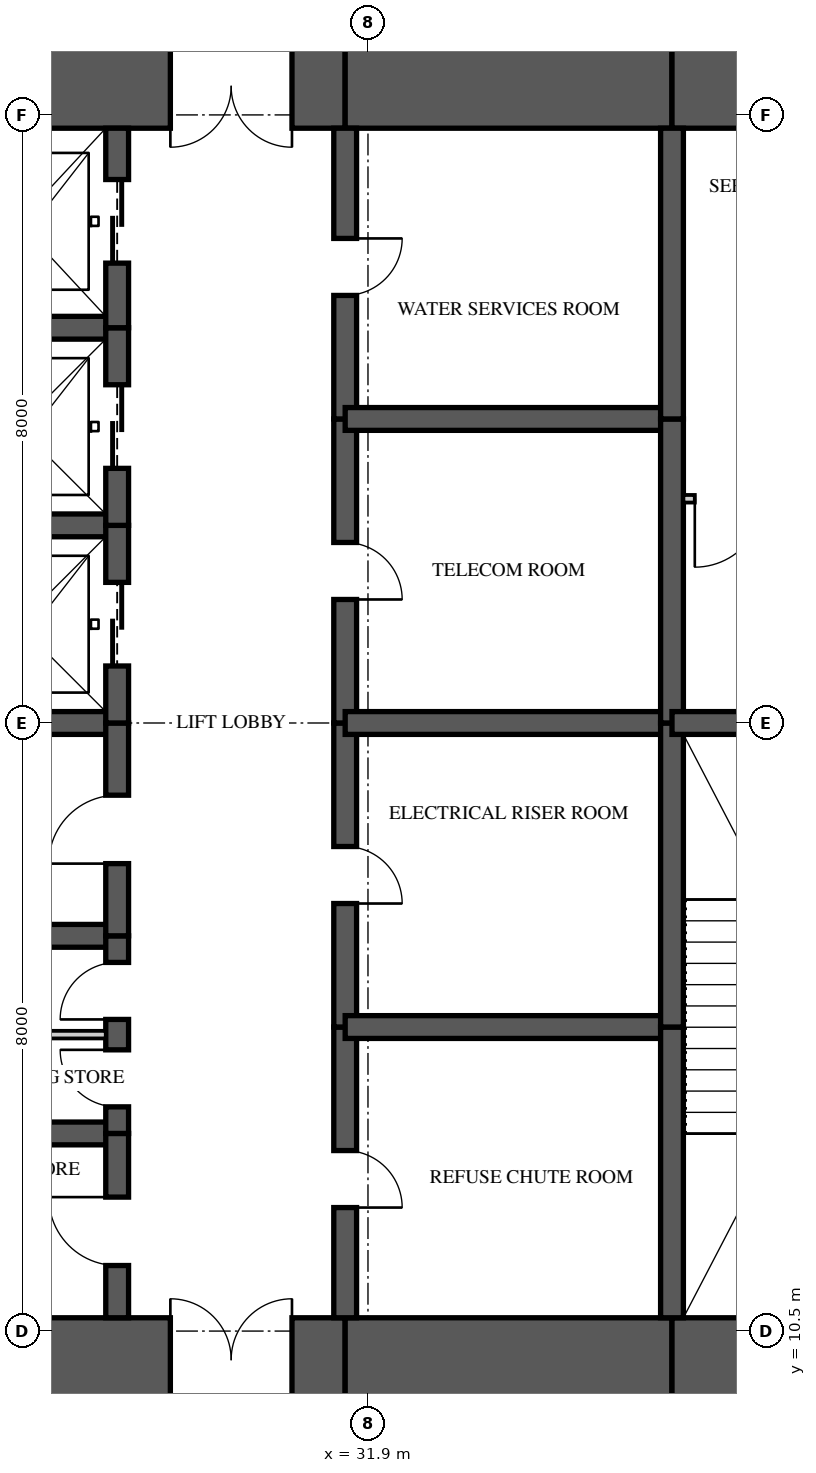
"""IFC4 building model, lengths in metres.
Left out: names, types, materials, properties, quantities, classifications, styles, units other than length and angle.
Written with IfcOpenShell. Run it as: python <this file> out.ifc"""

import sys

from ifc_helpers import new_model, si_unit, direction, frame, frame_2d, origin, place, context, subcontext, project, spatial, rectangle, extrude, element, fill, save


model = new_model("IFC4")
c1 = context("Model", 3, precision=1e-05, world=origin(), true_north=direction((0.0, 1.0)))
c2 = subcontext(c1, "Body", "Model", "MODEL_VIEW")
j1 = project(units=[si_unit("LENGTHUNIT", "METRE"), si_unit("PLANEANGLEUNIT", "RADIAN")], contexts=[c1])
p1 = place(None, origin())
s1 = spatial("IfcSite", under=j1, at=p1, CompositionType="ELEMENT")
p2 = place(p1, origin())
s2 = spatial("IfcBuilding", under=s1, at=p2, CompositionType="ELEMENT")
p3 = place(p2, frame((0.0, 0.0, 245.95)))
s3 = spatial("IfcBuildingStorey", under=s2, at=p3, CompositionType="ELEMENT", Elevation=245.95)
p4 = place(p3, frame((26.0, 10.125, 0.0), z_axis=(0.0, 0.0, 1.0), x_axis=(1.0, 0.0, 0.0)))
e1 = element("IfcWall", 1, at=p4, inside=s3, PredefinedType="SHEAR", context=c2, shape_type="SweptSolid", body=[
    extrude(rectangle(XDim=5.6, YDim=1.1, at=frame_2d((2.8, 0.0))), origin(), (0.0, 0.0, 1.0), 3.5),
])
p5 = place(p4, frame((3.3, 0.0, 0.0)))
e2 = element("IfcOpeningElement", 2, at=p5, cuts=e1, PredefinedType="OPENING", context=c2, shape_type="SweptSolid", body=[
    extrude(rectangle(XDim=1.6, YDim=2.1, at=frame_2d((0.8, 1.05))), frame((0.0, 0.56, 0.0), z_axis=(0.0, -1.0, 0.0), x_axis=(1.0, 0.0, 0.0)), (0.0, 0.0, 1.0), 1.12),
])
p6 = place(p3, frame((31.6, 10.125, 0.0), z_axis=(0.0, 0.0, 1.0), x_axis=(1.0, 0.0, 0.0)))
e3 = element("IfcWall", 3, at=p6, inside=s3, PredefinedType="SHEAR", context=c2, shape_type="SweptSolid", body=[
    extrude(rectangle(XDim=4.3, YDim=1.1, at=frame_2d((2.15, 0.0))), origin(), (0.0, 0.0, 1.0), 3.5),
])
p7 = place(p3, frame((35.9, 10.125, 0.0), z_axis=(0.0, 0.0, 1.0), x_axis=(1.0, 0.0, 0.0)))
e4 = element("IfcWall", 4, at=p7, inside=s3, PredefinedType="SHEAR", context=c2, shape_type="SweptSolid", body=[
    extrude(rectangle(XDim=8.175, YDim=1.1, at=frame_2d((4.087, 0.0))), origin(), (0.0, 0.0, 1.0), 3.5),
])
p8 = place(p7, frame((2.7, 0.0, 0.0)))
e5 = element("IfcOpeningElement", 5, at=p8, cuts=e4, PredefinedType="OPENING", context=c2, shape_type="SweptSolid", body=[
    extrude(rectangle(XDim=1.0, YDim=2.1, at=frame_2d((0.5, 1.05))), frame((0.0, 0.56, 0.0), z_axis=(0.0, -1.0, 0.0), x_axis=(1.0, 0.0, 0.0)), (0.0, 0.0, 1.0), 1.12),
])
p9 = place(p3, frame((44.075, 26.875, 0.0), z_axis=(0.0, 0.0, 1.0), x_axis=(-1.0, 0.0, 0.0)))
e6 = element("IfcWall", 6, at=p9, inside=s3, PredefinedType="SHEAR", context=c2, shape_type="SweptSolid", body=[
    extrude(rectangle(XDim=8.175, YDim=1.1, at=frame_2d((4.087, 0.0))), origin(), (0.0, 0.0, 1.0), 3.5),
])
p10 = place(p9, frame((5.575, 0.0, 0.0)))
e7 = element("IfcOpeningElement", 7, at=p10, cuts=e6, PredefinedType="OPENING", context=c2, shape_type="SweptSolid", body=[
    extrude(rectangle(XDim=0.9, YDim=2.1, at=frame_2d((0.45, 1.05))), frame((0.0, 0.56, 0.0), z_axis=(0.0, -1.0, 0.0), x_axis=(1.0, 0.0, 0.0)), (0.0, 0.0, 1.0), 1.12),
])
p11 = place(p3, frame((35.9, 26.875, 0.0), z_axis=(0.0, 0.0, 1.0), x_axis=(-1.0, 0.0, 0.0)))
e8 = element("IfcWall", 8, at=p11, inside=s3, PredefinedType="SHEAR", context=c2, shape_type="SweptSolid", body=[
    extrude(rectangle(XDim=4.3, YDim=1.1, at=frame_2d((2.15, 0.0))), origin(), (0.0, 0.0, 1.0), 3.5),
])
p12 = place(p3, frame((31.6, 26.875, 0.0), z_axis=(0.0, 0.0, 1.0), x_axis=(-1.0, 0.0, 0.0)))
e9 = element("IfcWall", 9, at=p12, inside=s3, PredefinedType="SHEAR", context=c2, shape_type="SweptSolid", body=[
    extrude(rectangle(XDim=5.6, YDim=1.1, at=frame_2d((2.8, 0.0))), origin(), (0.0, 0.0, 1.0), 3.5),
])
p13 = place(p12, frame((0.7, 0.0, 0.0)))
e10 = element("IfcOpeningElement", 10, at=p13, cuts=e9, PredefinedType="OPENING", context=c2, shape_type="SweptSolid", body=[
    extrude(rectangle(XDim=1.6, YDim=2.1, at=frame_2d((0.8, 1.05))), frame((0.0, 0.56, 0.0), z_axis=(0.0, -1.0, 0.0), x_axis=(1.0, 0.0, 0.0)), (0.0, 0.0, 1.0), 1.12),
])
p14 = place(p3, frame((28.6, 10.675, 0.0), z_axis=(0.0, 0.0, 1.0), x_axis=(0.0, 1.0, 0.0)))
e11 = element("IfcWall", 11, at=p14, inside=s3, PredefinedType="SHEAR", context=c2, shape_type="SweptSolid", body=[
    extrude(rectangle(XDim=2.425, YDim=0.3, at=frame_2d((1.212, 0.0))), origin(), (0.0, 0.0, 1.0), 3.5),
])
p15 = place(p14, frame((0.688, 0.0, 0.0)))
e12 = element("IfcOpeningElement", 12, at=p15, cuts=e11, PredefinedType="OPENING", context=c2, shape_type="SweptSolid", body=[
    extrude(rectangle(XDim=0.9, YDim=2.1, at=frame_2d((0.45, 1.05))), frame((0.0, 0.16, 0.0), z_axis=(0.0, -1.0, 0.0), x_axis=(1.0, 0.0, 0.0)), (0.0, 0.0, 1.0), 0.32),
])
p16 = place(p3, frame((28.6, 13.1, 0.0), z_axis=(0.0, 0.0, 1.0), x_axis=(0.0, 1.0, 0.0)))
e13 = element("IfcWall", 13, at=p16, inside=s3, PredefinedType="SHEAR", context=c2, shape_type="SweptSolid", body=[
    extrude(rectangle(XDim=2.6, YDim=0.3, at=frame_2d((1.3, 0.0))), origin(), (0.0, 0.0, 1.0), 3.5),
])
p17 = place(p16, frame((0.35, 0.0, 0.0)))
e14 = element("IfcOpeningElement", 14, at=p17, cuts=e13, PredefinedType="OPENING", context=c2, shape_type="SweptSolid", body=[
    extrude(rectangle(XDim=0.75, YDim=2.1, at=frame_2d((0.375, 1.05))), frame((0.0, 0.16, 0.0), z_axis=(0.0, -1.0, 0.0), x_axis=(1.0, 0.0, 0.0)), (0.0, 0.0, 1.0), 0.32),
])
p18 = place(p16, frame((1.5, 0.0, 0.0)))
e15 = element("IfcOpeningElement", 15, at=p18, cuts=e13, PredefinedType="OPENING", context=c2, shape_type="SweptSolid", body=[
    extrude(rectangle(XDim=0.75, YDim=2.1, at=frame_2d((0.375, 1.05))), frame((0.0, 0.16, 0.0), z_axis=(0.0, -1.0, 0.0), x_axis=(1.0, 0.0, 0.0)), (0.0, 0.0, 1.0), 0.32),
])
p19 = place(p3, frame((28.6, 15.7, 0.0), z_axis=(0.0, 0.0, 1.0), x_axis=(0.0, 1.0, 0.0)))
e16 = element("IfcWall", 16, at=p19, inside=s3, PredefinedType="SHEAR", context=c2, shape_type="SweptSolid", body=[
    extrude(rectangle(XDim=2.8, YDim=0.3, at=frame_2d((1.4, 0.0))), origin(), (0.0, 0.0, 1.0), 3.5),
])
p20 = place(p19, frame((0.95, 0.0, 0.0)))
e17 = element("IfcOpeningElement", 17, at=p20, cuts=e16, PredefinedType="OPENING", context=c2, shape_type="SweptSolid", body=[
    extrude(rectangle(XDim=0.9, YDim=2.1, at=frame_2d((0.45, 1.05))), frame((0.0, 0.16, 0.0), z_axis=(0.0, -1.0, 0.0), x_axis=(1.0, 0.0, 0.0)), (0.0, 0.0, 1.0), 0.32),
])
p21 = place(p3, frame((28.6, 18.5, 0.0), z_axis=(0.0, 0.0, 1.0), x_axis=(0.0, 1.0, 0.0)))
e18 = element("IfcWall", 18, at=p21, inside=s3, PredefinedType="SHEAR", context=c2, shape_type="SweptSolid", body=[
    extrude(rectangle(XDim=2.6, YDim=0.3, at=frame_2d((1.3, 0.0))), origin(), (0.0, 0.0, 1.0), 3.5),
])
p22 = place(p21, frame((0.75, 0.0, 0.0)))
e19 = element("IfcOpeningElement", 19, at=p22, cuts=e18, PredefinedType="OPENING", context=c2, shape_type="SweptSolid", body=[
    extrude(rectangle(XDim=1.1, YDim=2.1, at=frame_2d((0.55, 1.05))), frame((0.0, 0.16, 0.0), z_axis=(0.0, -1.0, 0.0), x_axis=(1.0, 0.0, 0.0)), (0.0, 0.0, 1.0), 0.32),
])
p23 = place(p3, frame((28.6, 21.1, 0.0), z_axis=(0.0, 0.0, 1.0), x_axis=(0.0, 1.0, 0.0)))
e20 = element("IfcWall", 20, at=p23, inside=s3, PredefinedType="SHEAR", context=c2, shape_type="SweptSolid", body=[
    extrude(rectangle(XDim=2.6, YDim=0.3, at=frame_2d((1.3, 0.0))), origin(), (0.0, 0.0, 1.0), 3.5),
])
p24 = place(p23, frame((0.75, 0.0, 0.0)))
e21 = element("IfcOpeningElement", 21, at=p24, cuts=e20, PredefinedType="OPENING", context=c2, shape_type="SweptSolid", body=[
    extrude(rectangle(XDim=1.1, YDim=2.1, at=frame_2d((0.55, 1.05))), frame((0.0, 0.16, 0.0), z_axis=(0.0, -1.0, 0.0), x_axis=(1.0, 0.0, 0.0)), (0.0, 0.0, 1.0), 0.32),
])
p25 = place(p3, frame((28.6, 23.7, 0.0), z_axis=(0.0, 0.0, 1.0), x_axis=(0.0, 1.0, 0.0)))
e22 = element("IfcWall", 22, at=p25, inside=s3, PredefinedType="SHEAR", context=c2, shape_type="SweptSolid", body=[
    extrude(rectangle(XDim=2.625, YDim=0.3, at=frame_2d((1.312, 0.0))), origin(), (0.0, 0.0, 1.0), 3.5),
])
p26 = place(p25, frame((0.85, 0.0, 0.0)))
e23 = element("IfcOpeningElement", 23, at=p26, cuts=e22, PredefinedType="OPENING", context=c2, shape_type="SweptSolid", body=[
    extrude(rectangle(XDim=1.1, YDim=2.1, at=frame_2d((0.55, 1.05))), frame((0.0, 0.16, 0.0), z_axis=(0.0, -1.0, 0.0), x_axis=(1.0, 0.0, 0.0)), (0.0, 0.0, 1.0), 0.32),
])
p27 = place(p3, frame((31.6, 10.675, 0.0), z_axis=(0.0, 0.0, 1.0), x_axis=(0.0, 1.0, 0.0)))
e24 = element("IfcWall", 24, at=p27, inside=s3, PredefinedType="SHEAR", context=c2, shape_type="SweptSolid", body=[
    extrude(rectangle(XDim=3.825, YDim=0.3, at=frame_2d((1.913, 0.0))), origin(), (0.0, 0.0, 1.0), 3.5),
])
p28 = place(p27, frame((1.45, 0.0, 0.0)))
e25 = element("IfcOpeningElement", 25, at=p28, cuts=e24, PredefinedType="OPENING", context=c2, shape_type="SweptSolid", body=[
    extrude(rectangle(XDim=0.75, YDim=2.1, at=frame_2d((0.375, 1.05))), frame((0.0, 0.16, 0.0), z_axis=(0.0, -1.0, 0.0), x_axis=(1.0, 0.0, 0.0)), (0.0, 0.0, 1.0), 0.32),
])
p29 = place(p3, frame((31.6, 14.5, 0.0), z_axis=(0.0, 0.0, 1.0), x_axis=(0.0, 1.0, 0.0)))
e26 = element("IfcWall", 26, at=p29, inside=s3, PredefinedType="SHEAR", context=c2, shape_type="SweptSolid", body=[
    extrude(rectangle(XDim=4.0, YDim=0.3, at=frame_2d((2.0, 0.0))), origin(), (0.0, 0.0, 1.0), 3.5),
])
p30 = place(p29, frame((1.625, 0.0, 0.0)))
e27 = element("IfcOpeningElement", 27, at=p30, cuts=e26, PredefinedType="OPENING", context=c2, shape_type="SweptSolid", body=[
    extrude(rectangle(XDim=0.75, YDim=2.1, at=frame_2d((0.375, 1.05))), frame((0.0, 0.16, 0.0), z_axis=(0.0, -1.0, 0.0), x_axis=(1.0, 0.0, 0.0)), (0.0, 0.0, 1.0), 0.32),
])
p31 = place(p3, frame((31.6, 18.5, 0.0), z_axis=(0.0, 0.0, 1.0), x_axis=(0.0, 1.0, 0.0)))
e28 = element("IfcWall", 28, at=p31, inside=s3, PredefinedType="SHEAR", context=c2, shape_type="SweptSolid", body=[
    extrude(rectangle(XDim=4.0, YDim=0.3, at=frame_2d((2.0, 0.0))), origin(), (0.0, 0.0, 1.0), 3.5),
])
p32 = place(p31, frame((1.625, 0.0, 0.0)))
e29 = element("IfcOpeningElement", 29, at=p32, cuts=e28, PredefinedType="OPENING", context=c2, shape_type="SweptSolid", body=[
    extrude(rectangle(XDim=0.75, YDim=2.1, at=frame_2d((0.375, 1.05))), frame((0.0, 0.16, 0.0), z_axis=(0.0, -1.0, 0.0), x_axis=(1.0, 0.0, 0.0)), (0.0, 0.0, 1.0), 0.32),
])
p33 = place(p3, frame((31.6, 22.5, 0.0), z_axis=(0.0, 0.0, 1.0), x_axis=(0.0, 1.0, 0.0)))
e30 = element("IfcWall", 30, at=p33, inside=s3, PredefinedType="SHEAR", context=c2, shape_type="SweptSolid", body=[
    extrude(rectangle(XDim=3.825, YDim=0.3, at=frame_2d((1.913, 0.0))), origin(), (0.0, 0.0, 1.0), 3.5),
])
p34 = place(p33, frame((1.625, 0.0, 0.0)))
e31 = element("IfcOpeningElement", 31, at=p34, cuts=e30, PredefinedType="OPENING", context=c2, shape_type="SweptSolid", body=[
    extrude(rectangle(XDim=0.75, YDim=2.1, at=frame_2d((0.375, 1.05))), frame((0.0, 0.16, 0.0), z_axis=(0.0, -1.0, 0.0), x_axis=(1.0, 0.0, 0.0)), (0.0, 0.0, 1.0), 0.32),
])
p35 = place(p3, frame((35.9, 10.675, 0.0), z_axis=(0.0, 0.0, 1.0), x_axis=(0.0, 1.0, 0.0)))
e32 = element("IfcWall", 32, at=p35, inside=s3, PredefinedType="SHEAR", context=c2, shape_type="SweptSolid", body=[
    extrude(rectangle(XDim=3.825, YDim=0.3, at=frame_2d((1.913, 0.0))), origin(), (0.0, 0.0, 1.0), 3.5),
])
for number, where, z_axis, x_axis in (
    (33, (35.9, 14.5, 0.0), (0.0, 0.0, 1.0), (0.0, 1.0, 0.0)),
    (34, (35.9, 18.5, 0.0), (0.0, 0.0, 1.0), (0.0, 1.0, 0.0)),
):
    element("IfcWall", number, at=place(p3, frame(where, z_axis=z_axis, x_axis=x_axis)), inside=s3, PredefinedType="SHEAR", context=c2, shape_type="SweptSolid", body=[
        extrude(rectangle(XDim=4.0, YDim=0.3, at=frame_2d((2.0, 0.0))), origin(), (0.0, 0.0, 1.0), 3.5),
    ])
p36 = place(p3, frame((35.9, 22.5, 0.0), z_axis=(0.0, 0.0, 1.0), x_axis=(0.0, 1.0, 0.0)))
e35 = element("IfcWall", 35, at=p36, inside=s3, PredefinedType="SHEAR", context=c2, shape_type="SweptSolid", body=[
    extrude(rectangle(XDim=3.825, YDim=0.3, at=frame_2d((1.913, 0.0))), origin(), (0.0, 0.0, 1.0), 3.5),
])
for number, where, z_axis, x_axis in (
    (36, (26.0, 13.1, 0.0), (0.0, 0.0, 1.0), (1.0, 0.0, 0.0)),
    (37, (26.0, 15.7, 0.0), (0.0, 0.0, 1.0), (1.0, 0.0, 0.0)),
    (38, (26.0, 18.5, 0.0), (0.0, 0.0, 1.0), (1.0, 0.0, 0.0)),
    (39, (26.0, 21.1, 0.0), (0.0, 0.0, 1.0), (1.0, 0.0, 0.0)),
    (40, (26.0, 23.7, 0.0), (0.0, 0.0, 1.0), (1.0, 0.0, 0.0)),
):
    element("IfcWall", number, at=place(p3, frame(where, z_axis=z_axis, x_axis=x_axis)), inside=s3, PredefinedType="SHEAR", context=c2, shape_type="SweptSolid", body=[
        extrude(rectangle(XDim=2.6, YDim=0.3, at=frame_2d((1.3, 0.0))), origin(), (0.0, 0.0, 1.0), 3.5),
    ])
for number, where, z_axis, x_axis in (
    (41, (31.6, 14.5, 0.0), (0.0, 0.0, 1.0), (1.0, 0.0, 0.0)),
    (42, (31.6, 18.5, 0.0), (0.0, 0.0, 1.0), (1.0, 0.0, 0.0)),
    (43, (31.6, 22.5, 0.0), (0.0, 0.0, 1.0), (1.0, 0.0, 0.0)),
):
    element("IfcWall", number, at=place(p3, frame(where, z_axis=z_axis, x_axis=x_axis)), inside=s3, PredefinedType="SHEAR", context=c2, shape_type="SweptSolid", body=[
        extrude(rectangle(XDim=4.3, YDim=0.3, at=frame_2d((2.15, 0.0))), origin(), (0.0, 0.0, 1.0), 3.5),
    ])
p37 = place(p3, frame((35.9, 18.5, 0.0), z_axis=(0.0, 0.0, 1.0), x_axis=(1.0, 0.0, 0.0)))
e44 = element("IfcWall", 44, at=p37, inside=s3, PredefinedType="SHEAR", context=c2, shape_type="SweptSolid", body=[
    extrude(rectangle(XDim=4.3, YDim=0.3, at=frame_2d((2.15, 0.0))), origin(), (0.0, 0.0, 1.0), 3.5),
])
p38 = place(p3, frame((36.05, 21.45, 0.0), z_axis=(0.0, 0.0, 1.0), x_axis=(1.0, 0.0, 0.0)))
e45 = element("IfcWall", 45, at=p38, inside=s3, PredefinedType="PARTITIONING", context=c2, shape_type="SweptSolid", body=[
    extrude(rectangle(XDim=4.0, YDim=0.1, at=frame_2d((2.0, 0.0))), origin(), (0.0, 0.0, 1.0), 3.26),
])
p39 = place(p38, frame((0.15, 0.0, 0.0)))
e46 = element("IfcOpeningElement", 46, at=p39, cuts=e45, PredefinedType="OPENING", context=c2, shape_type="SweptSolid", body=[
    extrude(rectangle(XDim=0.9, YDim=2.1, at=frame_2d((0.45, 1.05))), frame((0.0, 0.06, 0.0), z_axis=(0.0, -1.0, 0.0), x_axis=(1.0, 0.0, 0.0)), (0.0, 0.0, 1.0), 0.12),
])
p40 = place(p3, frame((26.15, 14.4, 0.0), z_axis=(0.0, 0.0, 1.0), x_axis=(1.0, 0.0, 0.0)))
e47 = element("IfcWall", 47, at=p40, inside=s3, PredefinedType="PARTITIONING", context=c2, shape_type="SweptSolid", body=[
    extrude(rectangle(XDim=2.3, YDim=0.1, at=frame_2d((1.15, 0.0))), origin(), (0.0, 0.0, 1.0), 3.26),
])
p41 = place(p39, frame((0.9, 0.0, 0.0), z_axis=(0.0, 0.0, 1.0), x_axis=(-1.0, 0.0, 0.0)))
e48 = element("IfcDoor", 48, at=p41, inside=s3, OperationType="SINGLE_SWING_RIGHT", PredefinedType="DOOR", context=c2, shape_type="SweptSolid", body=[
    extrude(rectangle(XDim=0.9, YDim=2.1, at=frame_2d((0.45, 1.05))), frame((0.0, 0.025, 0.0), z_axis=(0.0, -1.0, 0.0), x_axis=(1.0, 0.0, 0.0)), (0.0, 0.0, 1.0), 0.05),
])
fill(e46, e48)
p42 = place(p22, origin())
e49 = element("IfcDoor", 49, at=p42, inside=s3, OperationType="SLIDING_TO_LEFT", PredefinedType="DOOR", context=c2, shape_type="SweptSolid", body=[
    extrude(rectangle(XDim=1.1, YDim=2.1, at=frame_2d((0.55, 1.05))), frame((0.0, 0.025, 0.0), z_axis=(0.0, -1.0, 0.0), x_axis=(1.0, 0.0, 0.0)), (0.0, 0.0, 1.0), 0.05),
])
fill(e19, e49)
p43 = place(p24, origin())
e50 = element("IfcDoor", 50, at=p43, inside=s3, OperationType="SLIDING_TO_LEFT", PredefinedType="DOOR", context=c2, shape_type="SweptSolid", body=[
    extrude(rectangle(XDim=1.1, YDim=2.1, at=frame_2d((0.55, 1.05))), frame((0.0, 0.025, 0.0), z_axis=(0.0, -1.0, 0.0), x_axis=(1.0, 0.0, 0.0)), (0.0, 0.0, 1.0), 0.05),
])
fill(e21, e50)
p44 = place(p26, origin())
e51 = element("IfcDoor", 51, at=p44, inside=s3, OperationType="SLIDING_TO_LEFT", PredefinedType="DOOR", context=c2, shape_type="SweptSolid", body=[
    extrude(rectangle(XDim=1.1, YDim=2.1, at=frame_2d((0.55, 1.05))), frame((0.0, 0.025, 0.0), z_axis=(0.0, -1.0, 0.0), x_axis=(1.0, 0.0, 0.0)), (0.0, 0.0, 1.0), 0.05),
])
fill(e23, e51)
p45 = place(p15, origin())
e52 = element("IfcDoor", 52, at=p45, inside=s3, OperationType="SINGLE_SWING_RIGHT", PredefinedType="DOOR", context=c2, shape_type="SweptSolid", body=[
    extrude(rectangle(XDim=0.9, YDim=2.1, at=frame_2d((0.45, 1.05))), frame((0.0, 0.025, 0.0), z_axis=(0.0, -1.0, 0.0), x_axis=(1.0, 0.0, 0.0)), (0.0, 0.0, 1.0), 0.05),
])
fill(e12, e52)
p46 = place(p17, origin())
e53 = element("IfcDoor", 53, at=p46, inside=s3, OperationType="SINGLE_SWING_RIGHT", PredefinedType="DOOR", context=c2, shape_type="SweptSolid", body=[
    extrude(rectangle(XDim=0.75, YDim=2.1, at=frame_2d((0.375, 1.05))), frame((0.0, 0.025, 0.0), z_axis=(0.0, -1.0, 0.0), x_axis=(1.0, 0.0, 0.0)), (0.0, 0.0, 1.0), 0.05),
])
fill(e14, e53)
p47 = place(p18, origin())
e54 = element("IfcDoor", 54, at=p47, inside=s3, OperationType="SINGLE_SWING_LEFT", PredefinedType="DOOR", context=c2, shape_type="SweptSolid", body=[
    extrude(rectangle(XDim=0.75, YDim=2.1, at=frame_2d((0.375, 1.05))), frame((0.0, 0.025, 0.0), z_axis=(0.0, -1.0, 0.0), x_axis=(1.0, 0.0, 0.0)), (0.0, 0.0, 1.0), 0.05),
])
fill(e15, e54)
p48 = place(p20, origin())
e55 = element("IfcDoor", 55, at=p48, inside=s3, OperationType="SINGLE_SWING_LEFT", PredefinedType="DOOR", context=c2, shape_type="SweptSolid", body=[
    extrude(rectangle(XDim=0.9, YDim=2.1, at=frame_2d((0.45, 1.05))), frame((0.0, 0.025, 0.0), z_axis=(0.0, -1.0, 0.0), x_axis=(1.0, 0.0, 0.0)), (0.0, 0.0, 1.0), 0.05),
])
fill(e17, e55)
p49 = place(p5, origin())
e56 = element("IfcDoor", 56, at=p49, inside=s3, OperationType="DOUBLE_DOOR_SINGLE_SWING", PredefinedType="DOOR", context=c2, shape_type="SweptSolid", body=[
    extrude(rectangle(XDim=1.6, YDim=2.1, at=frame_2d((0.8, 1.05))), frame((0.0, 0.025, 0.0), z_axis=(0.0, -1.0, 0.0), x_axis=(1.0, 0.0, 0.0)), (0.0, 0.0, 1.0), 0.05),
])
fill(e2, e56)
p50 = place(p13, origin())
e57 = element("IfcDoor", 57, at=p50, inside=s3, OperationType="DOUBLE_DOOR_SINGLE_SWING", PredefinedType="DOOR", context=c2, shape_type="SweptSolid", body=[
    extrude(rectangle(XDim=1.6, YDim=2.1, at=frame_2d((0.8, 1.05))), frame((0.0, 0.025, 0.0), z_axis=(0.0, -1.0, 0.0), x_axis=(1.0, 0.0, 0.0)), (0.0, 0.0, 1.0), 0.05),
])
fill(e10, e57)
p51 = place(p28, frame((0.75, 0.0, 0.0), z_axis=(0.0, 0.0, 1.0), x_axis=(-1.0, 0.0, 0.0)))
e58 = element("IfcDoor", 58, at=p51, inside=s3, OperationType="SINGLE_SWING_RIGHT", PredefinedType="DOOR", context=c2, shape_type="SweptSolid", body=[
    extrude(rectangle(XDim=0.75, YDim=2.1, at=frame_2d((0.375, 1.05))), frame((0.0, 0.025, 0.0), z_axis=(0.0, -1.0, 0.0), x_axis=(1.0, 0.0, 0.0)), (0.0, 0.0, 1.0), 0.05),
])
fill(e25, e58)
p52 = place(p30, frame((0.75, 0.0, 0.0), z_axis=(0.0, 0.0, 1.0), x_axis=(-1.0, 0.0, 0.0)))
e59 = element("IfcDoor", 59, at=p52, inside=s3, OperationType="SINGLE_SWING_RIGHT", PredefinedType="DOOR", context=c2, shape_type="SweptSolid", body=[
    extrude(rectangle(XDim=0.75, YDim=2.1, at=frame_2d((0.375, 1.05))), frame((0.0, 0.025, 0.0), z_axis=(0.0, -1.0, 0.0), x_axis=(1.0, 0.0, 0.0)), (0.0, 0.0, 1.0), 0.05),
])
fill(e27, e59)
p53 = place(p32, frame((0.75, 0.0, 0.0), z_axis=(0.0, 0.0, 1.0), x_axis=(-1.0, 0.0, 0.0)))
e60 = element("IfcDoor", 60, at=p53, inside=s3, OperationType="SINGLE_SWING_RIGHT", PredefinedType="DOOR", context=c2, shape_type="SweptSolid", body=[
    extrude(rectangle(XDim=0.75, YDim=2.1, at=frame_2d((0.375, 1.05))), frame((0.0, 0.025, 0.0), z_axis=(0.0, -1.0, 0.0), x_axis=(1.0, 0.0, 0.0)), (0.0, 0.0, 1.0), 0.05),
])
fill(e29, e60)
p54 = place(p34, frame((0.75, 0.0, 0.0), z_axis=(0.0, 0.0, 1.0), x_axis=(-1.0, 0.0, 0.0)))
e61 = element("IfcDoor", 61, at=p54, inside=s3, OperationType="SINGLE_SWING_LEFT", PredefinedType="DOOR", context=c2, shape_type="SweptSolid", body=[
    extrude(rectangle(XDim=0.75, YDim=2.1, at=frame_2d((0.375, 1.05))), frame((0.0, 0.025, 0.0), z_axis=(0.0, -1.0, 0.0), x_axis=(1.0, 0.0, 0.0)), (0.0, 0.0, 1.0), 0.05),
])
fill(e31, e61)
save(model, sys.argv[1])
